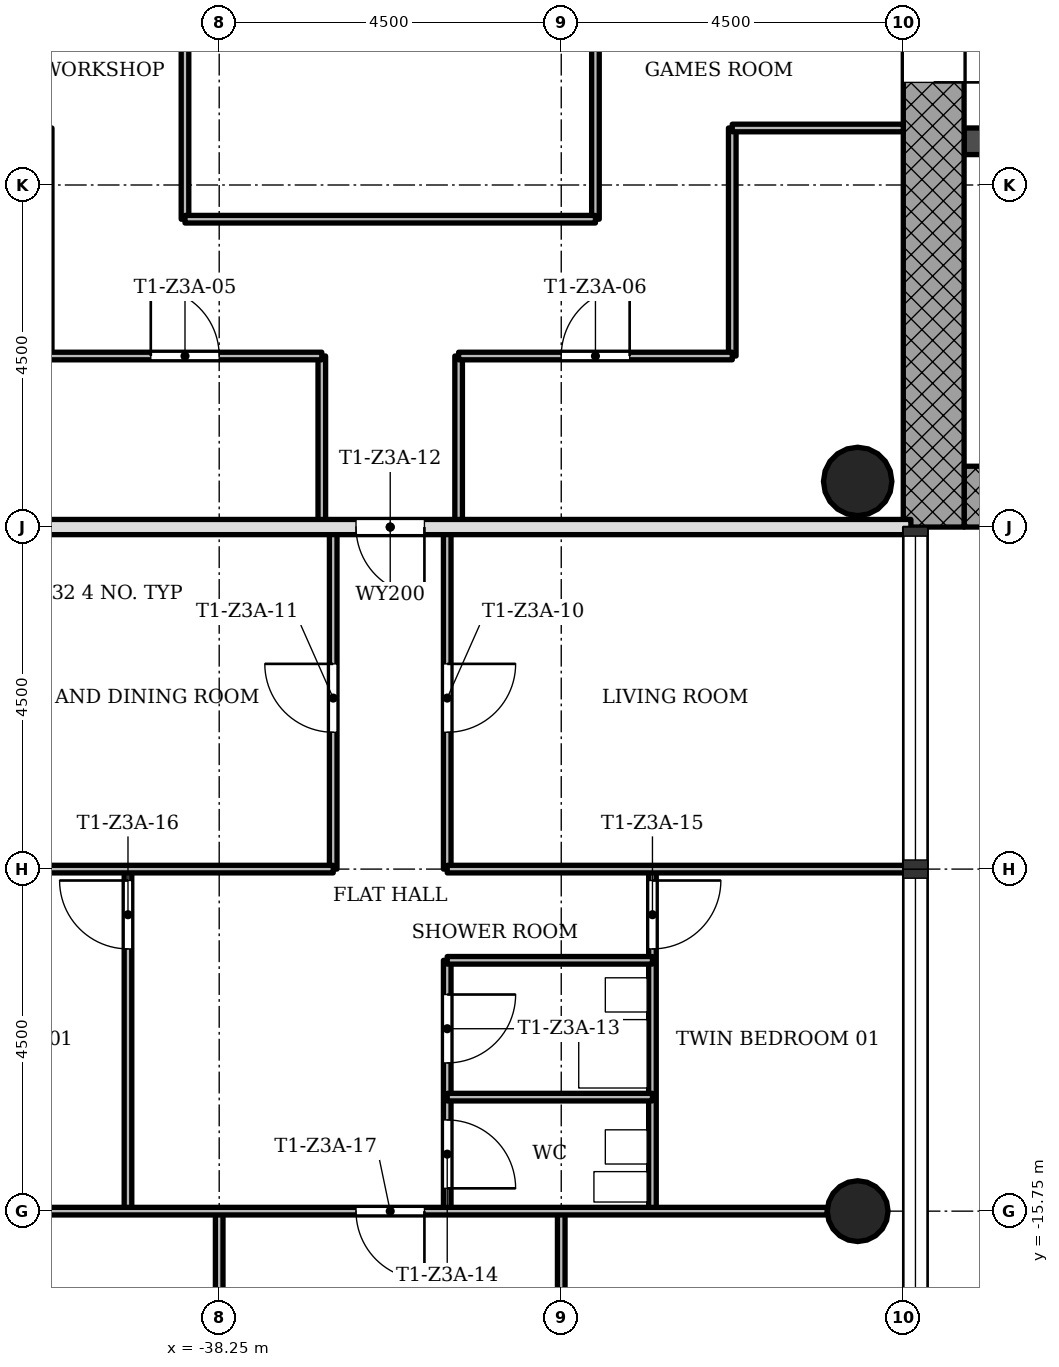
"""IFC4 building model, lengths in metres.
Left out: names, types, materials, properties, quantities, classifications, styles, units other than length and angle.
Written with IfcOpenShell. Run it as: python <this file> out.ifc"""

import sys

from ifc_helpers import new_model, si_unit, direction, frame, frame_2d, origin, origin_2d, place, context, subcontext, project, spatial, rectangle, hollow_circle, extrude, element, fill, save


model = new_model("IFC4")
c1 = context("Model", 3, precision=1e-05, world=origin(), true_north=direction((0.0, 1.0)))
c2 = subcontext(c1, "Body", "Model", "MODEL_VIEW")
j1 = project(units=[si_unit("LENGTHUNIT", "METRE"), si_unit("PLANEANGLEUNIT", "RADIAN")], contexts=[c1])
p1 = place(None, origin())
s1 = spatial("IfcSite", under=j1, at=p1, CompositionType="ELEMENT")
p2 = place(p1, origin())
s2 = spatial("IfcBuilding", under=s1, at=p2, CompositionType="ELEMENT")
p3 = place(p2, frame((0.0, 0.0, 133.7)))
s3 = spatial("IfcBuildingStorey", under=s2, at=p3, CompositionType="ELEMENT", Elevation=133.7)
p4 = place(p3, frame((-28.45, -6.35, 0.0), z_axis=(0.0, 0.0, 1.0), x_axis=(1.0, 0.0, 0.0)))
e1 = element("IfcWall", 1, at=p4, inside=s3, PredefinedType="SHEAR", context=c2, shape_type="SweptSolid", body=[
    extrude(rectangle(XDim=8.2, YDim=0.8, at=frame_2d((4.1, 0.0))), origin(), (0.0, 0.0, 1.0), 3.4),
])
p5 = place(p3, frame((-28.85, 5.95, 0.0), z_axis=(0.0, 0.0, 1.0), x_axis=(0.0, -1.0, 0.0)))
e2 = element("IfcWall", 2, at=p5, inside=s3, PredefinedType="SHEAR", context=c2, shape_type="SweptSolid", body=[
    extrude(rectangle(XDim=12.7, YDim=0.8, at=frame_2d((6.35, 0.0))), origin(), (0.0, 0.0, 1.0), 3.4),
])
p6 = place(p5, frame((5.05, 0.0, 0.0)))
e3 = element("IfcOpeningElement", 3, at=p6, cuts=e2, PredefinedType="OPENING", context=c2, shape_type="SweptSolid", body=[
    extrude(rectangle(XDim=1.8, YDim=2.1, at=frame_2d((0.9, 1.05))), frame((0.0, 0.41, 0.0), z_axis=(0.0, -1.0, 0.0), x_axis=(1.0, 0.0, 0.0)), (0.0, 0.0, 1.0), 0.82),
])
p7 = place(p3, frame((-28.45, -1.675, 0.0), z_axis=(0.0, 0.0, 1.0), x_axis=(1.0, 0.0, 0.0)))
e4 = element("IfcWall", 4, at=p7, inside=s3, PredefinedType="SHEAR", context=c2, shape_type="SweptSolid", body=[
    extrude(rectangle(XDim=7.4, YDim=0.35, at=frame_2d((3.7, 0.0))), origin(), (0.0, 0.0, 1.0), 3.4),
])
p8 = place(p7, frame((0.95, 0.0, 0.0)))
e5 = element("IfcOpeningElement", 5, at=p8, cuts=e4, PredefinedType="OPENING", context=c2, shape_type="SweptSolid", body=[
    extrude(rectangle(XDim=1.1, YDim=2.1, at=frame_2d((0.55, 1.05))), frame((0.0, 0.185, 0.0), z_axis=(0.0, -1.0, 0.0), x_axis=(1.0, 0.0, 0.0)), (0.0, 0.0, 1.0), 0.37),
])
p9 = place(p7, frame((3.15, 0.0, 0.0)))
e6 = element("IfcOpeningElement", 6, at=p9, cuts=e4, PredefinedType="OPENING", context=c2, shape_type="SweptSolid", body=[
    extrude(rectangle(XDim=1.1, YDim=2.1, at=frame_2d((0.55, 1.05))), frame((0.0, 0.185, 0.0), z_axis=(0.0, -1.0, 0.0), x_axis=(1.0, 0.0, 0.0)), (0.0, 0.0, 1.0), 0.37),
])
p10 = place(p7, frame((5.35, 0.0, 0.0)))
e7 = element("IfcOpeningElement", 7, at=p10, cuts=e4, PredefinedType="OPENING", context=c2, shape_type="SweptSolid", body=[
    extrude(rectangle(XDim=1.1, YDim=2.1, at=frame_2d((0.55, 1.05))), frame((0.0, 0.185, 0.0), z_axis=(0.0, -1.0, 0.0), x_axis=(1.0, 0.0, 0.0)), (0.0, 0.0, 1.0), 0.37),
])
p11 = place(p3, frame((-29.85, -15.75, 0.0), z_axis=(0.0, 0.0, 1.0), x_axis=(1.0, 0.0, 0.0)))
e8 = element("IfcColumn", 8, at=p11, inside=s3, PredefinedType="COLUMN", context=c2, shape_type="SweptSolid", body=[
    extrude(hollow_circle(Radius=0.4, WallThickness=0.028, at=origin_2d()), origin(), (0.0, 0.0, 1.0), 3.4),
])
p12 = place(p3, frame((-29.85, -6.15, 0.0), z_axis=(0.0, 0.0, 1.0), x_axis=(1.0, 0.0, 0.0)))
e9 = element("IfcColumn", 9, at=p12, inside=s3, PredefinedType="COLUMN", context=c2, shape_type="SweptSolid", body=[
    extrude(hollow_circle(Radius=0.45, WallThickness=0.032, at=origin_2d()), origin(), (0.0, 0.0, 1.0), 3.4),
])
p13 = place(p3, frame((-39.45, -15.75, 0.0), z_axis=(0.0, 0.0, 1.0), x_axis=(0.0, 1.0, 0.0)))
e10 = element("IfcWall", 10, at=p13, inside=s3, PredefinedType="PARTITIONING", context=c2, shape_type="SweptSolid", body=[
    extrude(rectangle(XDim=4.5, YDim=0.1, at=frame_2d((2.25, 0.0))), origin(), (0.0, 0.0, 1.0), 3.0),
])
p14 = place(p13, frame((3.45, 0.0, 0.0)))
e11 = element("IfcOpeningElement", 11, at=p14, cuts=e10, PredefinedType="OPENING", context=c2, shape_type="SweptSolid", body=[
    extrude(rectangle(XDim=0.9, YDim=2.1, at=frame_2d((0.45, 1.05))), frame((0.0, 0.06, 0.0), z_axis=(0.0, -1.0, 0.0), x_axis=(1.0, 0.0, 0.0)), (0.0, 0.0, 1.0), 0.12),
])
p15 = place(p3, frame((-38.7, -2.7, 0.0), z_axis=(0.0, 0.0, 1.0), x_axis=(0.0, 1.0, 0.0)))
e12 = element("IfcWall", 12, at=p15, inside=s3, PredefinedType="PARTITIONING", context=c2, shape_type="SweptSolid", body=[
    extrude(rectangle(XDim=5.4, YDim=0.1, at=frame_2d((2.7, 0.0))), origin(), (0.0, 0.0, 1.0), 3.0),
])
p16 = place(p3, frame((-38.25, -20.35, 0.0), z_axis=(0.0, 0.0, 1.0), x_axis=(0.0, 1.0, 0.0)))
e13 = element("IfcWall", 13, at=p16, inside=s3, PredefinedType="PARTITIONING", context=c2, shape_type="SweptSolid", body=[
    extrude(rectangle(XDim=4.6, YDim=0.1, at=frame_2d((2.3, 0.0))), origin(), (0.0, 0.0, 1.0), 3.0),
])
p17 = place(p16, frame((2.65, 0.0, 0.0)))
e14 = element("IfcOpeningElement", 14, at=p17, cuts=e13, PredefinedType="OPENING", context=c2, shape_type="SweptSolid", body=[
    extrude(rectangle(XDim=0.9, YDim=2.1, at=frame_2d((0.45, 1.05))), frame((0.0, 0.06, 0.0), z_axis=(0.0, -1.0, 0.0), x_axis=(1.0, 0.0, 0.0)), (0.0, 0.0, 1.0), 0.12),
])
p18 = place(p3, frame((-36.9, -6.75, 0.0), z_axis=(0.0, 0.0, 1.0), x_axis=(0.0, 1.0, 0.0)))
e15 = element("IfcWall", 15, at=p18, inside=s3, PredefinedType="PARTITIONING", context=c2, shape_type="SweptSolid", body=[
    extrude(rectangle(XDim=2.25, YDim=0.1, at=frame_2d((1.125, 0.0))), origin(), (0.0, 0.0, 1.0), 3.0),
])
p19 = place(p3, frame((-36.75, -11.25, 0.0), z_axis=(0.0, 0.0, 1.0), x_axis=(0.0, 1.0, 0.0)))
e16 = element("IfcWall", 16, at=p19, inside=s3, PredefinedType="PARTITIONING", context=c2, shape_type="SweptSolid", body=[
    extrude(rectangle(XDim=4.5, YDim=0.1, at=frame_2d((2.25, 0.0))), origin(), (0.0, 0.0, 1.0), 3.0),
])
p20 = place(p19, frame((1.8, 0.0, 0.0)))
e17 = element("IfcOpeningElement", 17, at=p20, cuts=e16, PredefinedType="OPENING", context=c2, shape_type="SweptSolid", body=[
    extrude(rectangle(XDim=0.9, YDim=2.1, at=frame_2d((0.45, 1.05))), frame((0.0, 0.06, 0.0), z_axis=(0.0, -1.0, 0.0), x_axis=(1.0, 0.0, 0.0)), (0.0, 0.0, 1.0), 0.12),
])
p21 = place(p3, frame((-35.25, -15.75, 0.0), z_axis=(0.0, 0.0, 1.0), x_axis=(0.0, 1.0, 0.0)))
e18 = element("IfcWall", 18, at=p21, inside=s3, PredefinedType="PARTITIONING", context=c2, shape_type="SweptSolid", body=[
    extrude(rectangle(XDim=3.3, YDim=0.1, at=frame_2d((1.65, 0.0))), origin(), (0.0, 0.0, 1.0), 3.0),
])
p22 = place(p21, frame((1.95, 0.0, 0.0)))
e19 = element("IfcOpeningElement", 19, at=p22, cuts=e18, PredefinedType="OPENING", context=c2, shape_type="SweptSolid", body=[
    extrude(rectangle(XDim=0.9, YDim=2.1, at=frame_2d((0.45, 1.05))), frame((0.0, 0.06, 0.0), z_axis=(0.0, -1.0, 0.0), x_axis=(1.0, 0.0, 0.0)), (0.0, 0.0, 1.0), 0.12),
])
p23 = place(p21, frame((0.3, 0.0, 0.0)))
e20 = element("IfcOpeningElement", 20, at=p23, cuts=e18, PredefinedType="OPENING", context=c2, shape_type="SweptSolid", body=[
    extrude(rectangle(XDim=0.9, YDim=2.1, at=frame_2d((0.45, 1.05))), frame((0.0, 0.06, 0.0), z_axis=(0.0, -1.0, 0.0), x_axis=(1.0, 0.0, 0.0)), (0.0, 0.0, 1.0), 0.12),
])
p24 = place(p3, frame((-35.25, -11.25, 0.0), z_axis=(0.0, 0.0, 1.0), x_axis=(0.0, 1.0, 0.0)))
e21 = element("IfcWall", 21, at=p24, inside=s3, PredefinedType="PARTITIONING", context=c2, shape_type="SweptSolid", body=[
    extrude(rectangle(XDim=4.5, YDim=0.1, at=frame_2d((2.25, 0.0))), origin(), (0.0, 0.0, 1.0), 3.0),
])
p25 = place(p24, frame((1.8, 0.0, 0.0)))
e22 = element("IfcOpeningElement", 22, at=p25, cuts=e21, PredefinedType="OPENING", context=c2, shape_type="SweptSolid", body=[
    extrude(rectangle(XDim=0.9, YDim=2.1, at=frame_2d((0.45, 1.05))), frame((0.0, 0.06, 0.0), z_axis=(0.0, -1.0, 0.0), x_axis=(1.0, 0.0, 0.0)), (0.0, 0.0, 1.0), 0.12),
])
p26 = place(p3, frame((-35.1, -6.75, 0.0), z_axis=(0.0, 0.0, 1.0), x_axis=(0.0, 1.0, 0.0)))
e23 = element("IfcWall", 23, at=p26, inside=s3, PredefinedType="PARTITIONING", context=c2, shape_type="SweptSolid", body=[
    extrude(rectangle(XDim=2.25, YDim=0.1, at=frame_2d((1.125, 0.0))), origin(), (0.0, 0.0, 1.0), 3.0),
])
p27 = place(p3, frame((-33.75, -20.35, 0.0), z_axis=(0.0, 0.0, 1.0), x_axis=(0.0, 1.0, 0.0)))
e24 = element("IfcWall", 24, at=p27, inside=s3, PredefinedType="PARTITIONING", context=c2, shape_type="SweptSolid", body=[
    extrude(rectangle(XDim=4.6, YDim=0.1, at=frame_2d((2.3, 0.0))), origin(), (0.0, 0.0, 1.0), 3.0),
])
p28 = place(p27, frame((2.65, 0.0, 0.0)))
e25 = element("IfcOpeningElement", 25, at=p28, cuts=e24, PredefinedType="OPENING", context=c2, shape_type="SweptSolid", body=[
    extrude(rectangle(XDim=0.9, YDim=2.1, at=frame_2d((0.45, 1.05))), frame((0.0, 0.06, 0.0), z_axis=(0.0, -1.0, 0.0), x_axis=(1.0, 0.0, 0.0)), (0.0, 0.0, 1.0), 0.12),
])
p29 = place(p3, frame((-33.3, -2.7, 0.0), z_axis=(0.0, 0.0, 1.0), x_axis=(0.0, 1.0, 0.0)))
e26 = element("IfcWall", 26, at=p29, inside=s3, PredefinedType="PARTITIONING", context=c2, shape_type="SweptSolid", body=[
    extrude(rectangle(XDim=5.4, YDim=0.1, at=frame_2d((2.7, 0.0))), origin(), (0.0, 0.0, 1.0), 3.0),
])
p30 = place(p3, frame((-32.55, -15.75, 0.0), z_axis=(0.0, 0.0, 1.0), x_axis=(0.0, 1.0, 0.0)))
e27 = element("IfcWall", 27, at=p30, inside=s3, PredefinedType="PARTITIONING", context=c2, shape_type="SweptSolid", body=[
    extrude(rectangle(XDim=4.5, YDim=0.1, at=frame_2d((2.25, 0.0))), origin(), (0.0, 0.0, 1.0), 3.0),
])
p31 = place(p30, frame((3.45, 0.0, 0.0)))
e28 = element("IfcOpeningElement", 28, at=p31, cuts=e27, PredefinedType="OPENING", context=c2, shape_type="SweptSolid", body=[
    extrude(rectangle(XDim=0.9, YDim=2.1, at=frame_2d((0.45, 1.05))), frame((0.0, 0.06, 0.0), z_axis=(0.0, -1.0, 0.0), x_axis=(1.0, 0.0, 0.0)), (0.0, 0.0, 1.0), 0.12),
])
p32 = place(p3, frame((-31.5, -4.5, 0.0), z_axis=(0.0, 0.0, 1.0), x_axis=(0.0, 1.0, 0.0)))
e29 = element("IfcWall", 29, at=p32, inside=s3, PredefinedType="PARTITIONING", context=c2, shape_type="SweptSolid", body=[
    extrude(rectangle(XDim=3.0, YDim=0.1, at=frame_2d((1.5, 0.0))), origin(), (0.0, 0.0, 1.0), 3.0),
])
p33 = place(p3, frame((-41.75, -15.75, 0.0), z_axis=(0.0, 0.0, 1.0), x_axis=(1.0, 0.0, 0.0)))
e30 = element("IfcWall", 30, at=p33, inside=s3, PredefinedType="PARTITIONING", context=c2, shape_type="SweptSolid", body=[
    extrude(rectangle(XDim=11.5, YDim=0.1, at=frame_2d((5.75, 0.0))), origin(), (0.0, 0.0, 1.0), 3.0),
])
p34 = place(p33, frame((5.3, 0.0, 0.0)))
e31 = element("IfcOpeningElement", 31, at=p34, cuts=e30, PredefinedType="OPENING", context=c2, shape_type="SweptSolid", body=[
    extrude(rectangle(XDim=0.9, YDim=2.1, at=frame_2d((0.45, 1.05))), frame((0.0, 0.06, 0.0), z_axis=(0.0, -1.0, 0.0), x_axis=(1.0, 0.0, 0.0)), (0.0, 0.0, 1.0), 0.12),
])
for number, where, z_axis, x_axis in (
    (32, (-35.25, -14.25, 0.0), (0.0, 0.0, 1.0), (1.0, 0.0, 0.0)),
    (33, (-35.25, -12.45, 0.0), (0.0, 0.0, 1.0), (1.0, 0.0, 0.0)),
):
    element("IfcWall", number, at=place(p3, frame(where, z_axis=z_axis, x_axis=x_axis)), inside=s3, PredefinedType="PARTITIONING", context=c2, shape_type="SweptSolid", body=[
        extrude(rectangle(XDim=2.7, YDim=0.1, at=frame_2d((1.35, 0.0))), origin(), (0.0, 0.0, 1.0), 3.0),
    ])
for number, where, z_axis, x_axis in (
    (34, (-42.85, -11.25, 0.0), (0.0, 0.0, 1.0), (1.0, 0.0, 0.0)),
    (35, (-35.25, -11.25, 0.0), (0.0, 0.0, 1.0), (1.0, 0.0, 0.0)),
):
    element("IfcWall", number, at=place(p3, frame(where, z_axis=z_axis, x_axis=x_axis)), inside=s3, PredefinedType="PARTITIONING", context=c2, shape_type="SweptSolid", body=[
        extrude(rectangle(XDim=6.1, YDim=0.1, at=frame_2d((3.05, 0.0))), origin(), (0.0, 0.0, 1.0), 3.0),
    ])
p35 = place(p3, frame((-42.85, -6.75, 0.0), z_axis=(0.0, 0.0, 1.0), x_axis=(1.0, 0.0, 0.0)))
e36 = element("IfcWall", 36, at=p35, inside=s3, PredefinedType="SOLIDWALL", context=c2, shape_type="SweptSolid", body=[
    extrude(rectangle(XDim=13.7, YDim=0.2, at=frame_2d((6.85, 0.0))), origin(), (0.0, 0.0, 1.0), 3.0),
])
p36 = place(p35, frame((6.4, 0.0, 0.0)))
e37 = element("IfcOpeningElement", 37, at=p36, cuts=e36, PredefinedType="OPENING", context=c2, shape_type="SweptSolid", body=[
    extrude(rectangle(XDim=0.9, YDim=2.1, at=frame_2d((0.45, 1.05))), frame((0.0, 0.11, 0.0), z_axis=(0.0, -1.0, 0.0), x_axis=(1.0, 0.0, 0.0)), (0.0, 0.0, 1.0), 0.22),
])
p37 = place(p3, frame((-40.5, -4.5, 0.0), z_axis=(0.0, 0.0, 1.0), x_axis=(1.0, 0.0, 0.0)))
e38 = element("IfcWall", 38, at=p37, inside=s3, PredefinedType="PARTITIONING", context=c2, shape_type="SweptSolid", body=[
    extrude(rectangle(XDim=3.6, YDim=0.1, at=frame_2d((1.8, 0.0))), origin(), (0.0, 0.0, 1.0), 3.0),
])
p38 = place(p37, frame((1.35, 0.0, 0.0)))
e39 = element("IfcOpeningElement", 39, at=p38, cuts=e38, PredefinedType="OPENING", context=c2, shape_type="SweptSolid", body=[
    extrude(rectangle(XDim=0.9, YDim=2.1, at=frame_2d((0.45, 1.05))), frame((0.0, 0.06, 0.0), z_axis=(0.0, -1.0, 0.0), x_axis=(1.0, 0.0, 0.0)), (0.0, 0.0, 1.0), 0.12),
])
p39 = place(p3, frame((-35.1, -4.5, 0.0), z_axis=(0.0, 0.0, 1.0), x_axis=(1.0, 0.0, 0.0)))
e40 = element("IfcWall", 40, at=p39, inside=s3, PredefinedType="PARTITIONING", context=c2, shape_type="SweptSolid", body=[
    extrude(rectangle(XDim=3.6, YDim=0.1, at=frame_2d((1.8, 0.0))), origin(), (0.0, 0.0, 1.0), 3.0),
])
p40 = place(p39, frame((1.35, 0.0, 0.0)))
e41 = element("IfcOpeningElement", 41, at=p40, cuts=e40, PredefinedType="OPENING", context=c2, shape_type="SweptSolid", body=[
    extrude(rectangle(XDim=0.9, YDim=2.1, at=frame_2d((0.45, 1.05))), frame((0.0, 0.06, 0.0), z_axis=(0.0, -1.0, 0.0), x_axis=(1.0, 0.0, 0.0)), (0.0, 0.0, 1.0), 0.12),
])
p41 = place(p3, frame((-38.7, -2.7, 0.0), z_axis=(0.0, 0.0, 1.0), x_axis=(1.0, 0.0, 0.0)))
e42 = element("IfcWall", 42, at=p41, inside=s3, PredefinedType="PARTITIONING", context=c2, shape_type="SweptSolid", body=[
    extrude(rectangle(XDim=5.4, YDim=0.1, at=frame_2d((2.7, 0.0))), origin(), (0.0, 0.0, 1.0), 3.0),
])
p42 = place(p3, frame((-31.5, -1.5, 0.0), z_axis=(0.0, 0.0, 1.0), x_axis=(1.0, 0.0, 0.0)))
e43 = element("IfcWall", 43, at=p42, inside=s3, PredefinedType="PARTITIONING", context=c2, shape_type="SweptSolid", body=[
    extrude(rectangle(XDim=2.25, YDim=0.1, at=frame_2d((1.125, 0.0))), origin(), (0.0, 0.0, 1.0), 3.0),
])
p43 = place(p38, origin())
e44 = element("IfcDoor", 44, at=p43, inside=s3, OperationType="SINGLE_SWING_RIGHT", PredefinedType="DOOR", context=c2, shape_type="SweptSolid", body=[
    extrude(rectangle(XDim=0.9, YDim=2.1, at=frame_2d((0.45, 1.05))), frame((0.0, 0.025, 0.0), z_axis=(0.0, -1.0, 0.0), x_axis=(1.0, 0.0, 0.0)), (0.0, 0.0, 1.0), 0.05),
])
fill(e39, e44)
p44 = place(p40, origin())
e45 = element("IfcDoor", 45, at=p44, inside=s3, OperationType="SINGLE_SWING_LEFT", PredefinedType="DOOR", context=c2, shape_type="SweptSolid", body=[
    extrude(rectangle(XDim=0.9, YDim=2.1, at=frame_2d((0.45, 1.05))), frame((0.0, 0.025, 0.0), z_axis=(0.0, -1.0, 0.0), x_axis=(1.0, 0.0, 0.0)), (0.0, 0.0, 1.0), 0.05),
])
fill(e41, e45)
p45 = place(p25, origin())
e46 = element("IfcDoor", 46, at=p45, inside=s3, OperationType="SINGLE_SWING_RIGHT", PredefinedType="DOOR", context=c2, shape_type="SweptSolid", body=[
    extrude(rectangle(XDim=0.9, YDim=2.1, at=frame_2d((0.45, 1.05))), frame((0.0, 0.025, 0.0), z_axis=(0.0, -1.0, 0.0), x_axis=(1.0, 0.0, 0.0)), (0.0, 0.0, 1.0), 0.05),
])
fill(e22, e46)
p46 = place(p20, origin())
e47 = element("IfcDoor", 47, at=p46, inside=s3, OperationType="SINGLE_SWING_LEFT", PredefinedType="DOOR", context=c2, shape_type="SweptSolid", body=[
    extrude(rectangle(XDim=0.9, YDim=2.1, at=frame_2d((0.45, 1.05))), frame((0.0, 0.025, 0.0), z_axis=(0.0, -1.0, 0.0), x_axis=(1.0, 0.0, 0.0)), (0.0, 0.0, 1.0), 0.05),
])
fill(e17, e47)
p47 = place(p36, origin())
e48 = element("IfcDoor", 48, at=p47, inside=s3, OperationType="SINGLE_SWING_RIGHT", PredefinedType="DOOR", context=c2, shape_type="SweptSolid", body=[
    extrude(rectangle(XDim=0.9, YDim=2.1, at=frame_2d((0.45, 1.05))), frame((0.0, 0.025, 0.0), z_axis=(0.0, -1.0, 0.0), x_axis=(1.0, 0.0, 0.0)), (0.0, 0.0, 1.0), 0.05),
])
fill(e37, e48)
p48 = place(p22, origin())
e49 = element("IfcDoor", 49, at=p48, inside=s3, OperationType="SINGLE_SWING_RIGHT", PredefinedType="DOOR", context=c2, shape_type="SweptSolid", body=[
    extrude(rectangle(XDim=0.9, YDim=2.1, at=frame_2d((0.45, 1.05))), frame((0.0, 0.025, 0.0), z_axis=(0.0, -1.0, 0.0), x_axis=(1.0, 0.0, 0.0)), (0.0, 0.0, 1.0), 0.05),
])
fill(e19, e49)
p49 = place(p23, origin())
e50 = element("IfcDoor", 50, at=p49, inside=s3, OperationType="SINGLE_SWING_LEFT", PredefinedType="DOOR", context=c2, shape_type="SweptSolid", body=[
    extrude(rectangle(XDim=0.9, YDim=2.1, at=frame_2d((0.45, 1.05))), frame((0.0, 0.025, 0.0), z_axis=(0.0, -1.0, 0.0), x_axis=(1.0, 0.0, 0.0)), (0.0, 0.0, 1.0), 0.05),
])
fill(e20, e50)
p50 = place(p31, origin())
e51 = element("IfcDoor", 51, at=p50, inside=s3, OperationType="SINGLE_SWING_RIGHT", PredefinedType="DOOR", context=c2, shape_type="SweptSolid", body=[
    extrude(rectangle(XDim=0.9, YDim=2.1, at=frame_2d((0.45, 1.05))), frame((0.0, 0.025, 0.0), z_axis=(0.0, -1.0, 0.0), x_axis=(1.0, 0.0, 0.0)), (0.0, 0.0, 1.0), 0.05),
])
fill(e28, e51)
p51 = place(p14, origin())
e52 = element("IfcDoor", 52, at=p51, inside=s3, OperationType="SINGLE_SWING_LEFT", PredefinedType="DOOR", context=c2, shape_type="SweptSolid", body=[
    extrude(rectangle(XDim=0.9, YDim=2.1, at=frame_2d((0.45, 1.05))), frame((0.0, 0.025, 0.0), z_axis=(0.0, -1.0, 0.0), x_axis=(1.0, 0.0, 0.0)), (0.0, 0.0, 1.0), 0.05),
])
fill(e11, e52)
p52 = place(p34, origin())
e53 = element("IfcDoor", 53, at=p52, inside=s3, OperationType="SINGLE_SWING_RIGHT", PredefinedType="DOOR", context=c2, shape_type="SweptSolid", body=[
    extrude(rectangle(XDim=0.9, YDim=2.1, at=frame_2d((0.45, 1.05))), frame((0.0, 0.025, 0.0), z_axis=(0.0, -1.0, 0.0), x_axis=(1.0, 0.0, 0.0)), (0.0, 0.0, 1.0), 0.05),
])
fill(e31, e53)
p53 = place(p6, origin())
e54 = element("IfcDoor", 54, at=p53, inside=s3, OperationType="SINGLE_SWING_LEFT", PredefinedType="DOOR", context=c2, shape_type="SweptSolid", body=[
    extrude(rectangle(XDim=1.8, YDim=2.1, at=frame_2d((0.9, 1.05))), frame((0.0, 0.025, 0.0), z_axis=(0.0, -1.0, 0.0), x_axis=(1.0, 0.0, 0.0)), (0.0, 0.0, 1.0), 0.05),
])
fill(e3, e54)
save(model, sys.argv[1])
